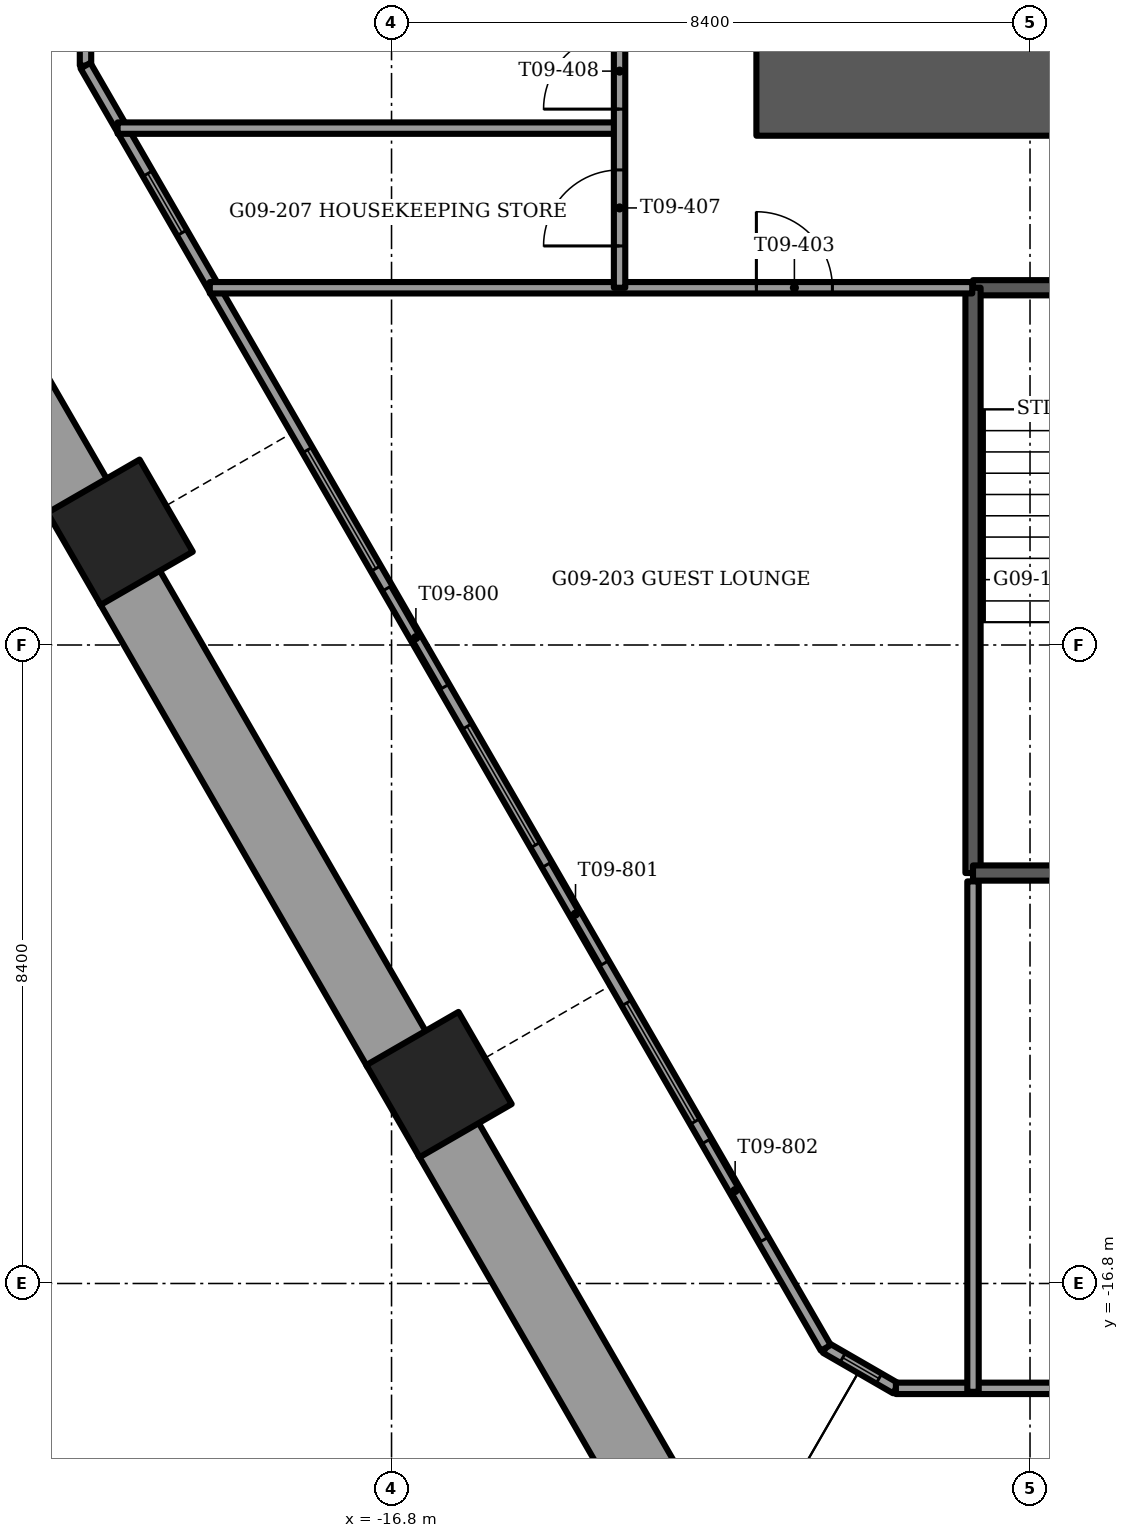
"""IFC4 building model, lengths in metres.
Left out: names, types, materials, properties, quantities, classifications, styles, units other than length and angle.
Written with IfcOpenShell. Run it as: python <this file> out.ifc"""

import sys

from ifc_helpers import new_model, si_unit, direction, frame, frame_2d, origin, origin_2d, place, context, subcontext, project, spatial, rectangle, extrude, element, fill, save


model = new_model("IFC4")
c1 = context("Model", 3, precision=1e-05, world=origin(), true_north=direction((0.0, 1.0)))
c2 = subcontext(c1, "Body", "Model", "MODEL_VIEW")
j1 = project(units=[si_unit("LENGTHUNIT", "METRE"), si_unit("PLANEANGLEUNIT", "RADIAN")], contexts=[c1])
p1 = place(None, origin())
s1 = spatial("IfcSite", under=j1, at=p1, CompositionType="ELEMENT")
p2 = place(p1, origin())
s2 = spatial("IfcBuilding", under=s1, at=p2, CompositionType="ELEMENT")
p3 = place(p2, frame((0.0, 0.0, 39.25)))
s3 = spatial("IfcBuildingStorey", under=s2, at=p3, CompositionType="ELEMENT", Elevation=39.25)
for number, where, z_axis, x_axis in (
    (1, (-20.371, -6.917, -1.2), (0.0, 0.0, 1.0), (-0.5, 0.866, 0.0)),
    (2, (-16.175, -14.183, -1.2), (0.0, 0.0, 1.0), (-0.5, 0.866, 0.0)),
):
    element("IfcColumn", number, at=place(p3, frame(where, z_axis=z_axis, x_axis=x_axis)), inside=s3, PredefinedType="COLUMN", context=c2, shape_type="SweptSolid", body=[
        extrude(rectangle(XDim=1.4, YDim=1.4, at=origin_2d()), origin(), (0.0, 0.0, 1.0), 3.75),
    ])
p4 = place(p3, frame((-12.0, -1.1, -0.3), z_axis=(0.0, 0.0, 1.0), x_axis=(1.0, 0.0, 0.0)))
e3 = element("IfcWall", 3, at=p4, inside=s3, PredefinedType="SHEAR", context=c2, shape_type="SweptSolid", body=[
    extrude(rectangle(XDim=24.0, YDim=1.2, at=frame_2d((12.0, 0.0))), origin(), (0.0, 0.0, 1.0), 3.75),
])
p5 = place(p4, frame((11.2, 0.0, 0.0)))
e4 = element("IfcOpeningElement", 4, at=p5, cuts=e3, PredefinedType="OPENING", context=c2, shape_type="SweptSolid", body=[
    extrude(rectangle(XDim=1.6, YDim=2.1, at=frame_2d((0.8, 1.05))), frame((0.0, 0.6, 0.0), z_axis=(0.0, -1.0, 0.0), x_axis=(1.0, 0.0, 0.0)), (0.0, 0.0, 1.0), 1.2),
])
p6 = place(p3, frame((-24.132, -0.901, 0.0), z_axis=(0.0, 0.0, 1.0), x_axis=(0.499983599745, -0.866034872269, 0.0)))
e5 = element("IfcWall", 5, at=p6, inside=s3, PredefinedType="PARAPET", context=c2, shape_type="SweptSolid", body=[
    extrude(rectangle(XDim=6.42, YDim=0.9, at=frame_2d((3.21, 0.0))), origin(), (0.0, 0.0, 1.0), 1.1),
])
p7 = place(p3, frame((-20.252, -7.622, 0.0), z_axis=(0.0, 0.0, 1.0), x_axis=(0.499997206141, -0.866027016814, 0.0)))
e6 = element("IfcWall", 6, at=p7, inside=s3, PredefinedType="PARAPET", context=c2, shape_type="SweptSolid", body=[
    extrude(rectangle(XDim=7.051, YDim=0.9, at=frame_2d((3.525, 0.0))), origin(), (0.0, 0.0, 1.0), 1.1),
])
p8 = place(p3, frame((-16.057, -14.889, 0.0), z_axis=(0.0, 0.0, 1.0), x_axis=(0.500000066162, -0.866025365586, 0.0)))
e7 = element("IfcWall", 7, at=p8, inside=s3, PredefinedType="PARAPET", context=c2, shape_type="SweptSolid", body=[
    extrude(rectangle(XDim=6.42, YDim=0.9, at=frame_2d((3.21, 0.0))), origin(), (0.0, 0.0, 1.0), 1.1),
])
p9 = place(p3, frame((-20.826, -0.778, 0.0), z_axis=(0.0, 0.0, 1.0), x_axis=(0.499999841607, -0.866025495233, 0.0)))
e8 = element("IfcWall", 8, at=p9, inside=s3, PredefinedType="SOLIDWALL", context=c2, shape_type="SweptSolid", body=[
    extrude(rectangle(XDim=19.479, YDim=0.15, at=frame_2d((9.739, 0.0))), origin(), (0.0, 0.0, 1.0), 3.45),
])
p10 = place(p9, frame((1.639, 0.0, 0.15)))
e9 = element("IfcOpeningElement", 9, at=p10, cuts=e8, PredefinedType="OPENING", context=c2, shape_type="SweptSolid", body=[
    extrude(rectangle(XDim=0.9, YDim=2.85, at=frame_2d((0.45, 1.425))), frame((0.0, 0.075, 0.0), z_axis=(0.0, -1.0, 0.0), x_axis=(1.0, 0.0, 0.0)), (0.0, 0.0, 1.0), 0.15),
])
p11 = place(p9, frame((5.839, 0.0, 0.15)))
e10 = element("IfcOpeningElement", 10, at=p11, cuts=e8, PredefinedType="OPENING", context=c2, shape_type="SweptSolid", body=[
    extrude(rectangle(XDim=1.8, YDim=2.85, at=frame_2d((0.9, 1.425))), frame((0.0, 0.075, 0.0), z_axis=(0.0, -1.0, 0.0), x_axis=(1.0, 0.0, 0.0)), (0.0, 0.0, 1.0), 0.15),
])
p12 = place(p9, frame((7.939, 0.0, 0.0)))
e11 = element("IfcOpeningElement", 11, at=p12, cuts=e8, PredefinedType="OPENING", context=c2, shape_type="SweptSolid", body=[
    extrude(rectangle(XDim=1.5, YDim=2.4, at=frame_2d((0.75, 1.2))), frame((0.0, 0.075, 0.0), z_axis=(0.0, -1.0, 0.0), x_axis=(1.0, 0.0, 0.0)), (0.0, 0.0, 1.0), 0.15),
])
p13 = place(p9, frame((10.039, 0.0, 0.15)))
e12 = element("IfcOpeningElement", 12, at=p13, cuts=e8, PredefinedType="OPENING", context=c2, shape_type="SweptSolid", body=[
    extrude(rectangle(XDim=1.8, YDim=2.85, at=frame_2d((0.9, 1.425))), frame((0.0, 0.075, 0.0), z_axis=(0.0, -1.0, 0.0), x_axis=(1.0, 0.0, 0.0)), (0.0, 0.0, 1.0), 0.15),
])
p14 = place(p9, frame((12.139, 0.0, 0.0)))
e13 = element("IfcOpeningElement", 13, at=p14, cuts=e8, PredefinedType="OPENING", context=c2, shape_type="SweptSolid", body=[
    extrude(rectangle(XDim=1.5, YDim=2.4, at=frame_2d((0.75, 1.2))), frame((0.0, 0.075, 0.0), z_axis=(0.0, -1.0, 0.0), x_axis=(1.0, 0.0, 0.0)), (0.0, 0.0, 1.0), 0.15),
])
p15 = place(p9, frame((14.239, 0.0, 0.15)))
e14 = element("IfcOpeningElement", 14, at=p15, cuts=e8, PredefinedType="OPENING", context=c2, shape_type="SweptSolid", body=[
    extrude(rectangle(XDim=1.8, YDim=2.85, at=frame_2d((0.9, 1.425))), frame((0.0, 0.075, 0.0), z_axis=(0.0, -1.0, 0.0), x_axis=(1.0, 0.0, 0.0)), (0.0, 0.0, 1.0), 0.15),
])
p16 = place(p9, frame((16.339, 0.0, 0.0)))
e15 = element("IfcOpeningElement", 15, at=p16, cuts=e8, PredefinedType="OPENING", context=c2, shape_type="SweptSolid", body=[
    extrude(rectangle(XDim=1.5, YDim=2.4, at=frame_2d((0.75, 1.2))), frame((0.0, 0.075, 0.0), z_axis=(0.0, -1.0, 0.0), x_axis=(1.0, 0.0, 0.0)), (0.0, 0.0, 1.0), 0.15),
])
p17 = place(p3, frame((-10.165, -18.179, 0.0), z_axis=(0.0, 0.0, 1.0), x_axis=(1.0, 0.0, 0.0)))
e16 = element("IfcWall", 16, at=p17, inside=s3, PredefinedType="SOLIDWALL", context=c2, shape_type="SweptSolid", body=[
    extrude(rectangle(XDim=20.329, YDim=0.15, at=frame_2d((10.165, 0.0))), origin(), (0.0, 0.0, 1.0), 3.45),
])
p18 = place(p17, frame((2.064, 0.0, 0.15)))
e17 = element("IfcOpeningElement", 17, at=p18, cuts=e16, PredefinedType="OPENING", context=c2, shape_type="SweptSolid", body=[
    extrude(rectangle(XDim=1.8, YDim=2.85, at=frame_2d((0.9, 1.425))), frame((0.0, 0.075, 0.0), z_axis=(0.0, -1.0, 0.0), x_axis=(1.0, 0.0, 0.0)), (0.0, 0.0, 1.0), 0.15),
])
p19 = place(p17, frame((6.314, 0.0, 0.15)))
e18 = element("IfcOpeningElement", 18, at=p19, cuts=e16, PredefinedType="OPENING", context=c2, shape_type="SweptSolid", body=[
    extrude(rectangle(XDim=0.9, YDim=2.85, at=frame_2d((0.45, 1.425))), frame((0.0, 0.075, 0.0), z_axis=(0.0, -1.0, 0.0), x_axis=(1.0, 0.0, 0.0)), (0.0, 0.0, 1.0), 0.15),
])
p20 = place(p17, frame((7.764, 0.0, 0.0)))
e19 = element("IfcOpeningElement", 19, at=p20, cuts=e16, PredefinedType="OPENING", context=c2, shape_type="SweptSolid", body=[
    extrude(rectangle(XDim=1.5, YDim=2.4, at=frame_2d((0.75, 1.2))), frame((0.0, 0.075, 0.0), z_axis=(0.0, -1.0, 0.0), x_axis=(1.0, 0.0, 0.0)), (0.0, 0.0, 1.0), 0.15),
])
p21 = place(p17, frame((10.514, 0.0, 0.15)))
e20 = element("IfcOpeningElement", 20, at=p21, cuts=e16, PredefinedType="OPENING", context=c2, shape_type="SweptSolid", body=[
    extrude(rectangle(XDim=1.8, YDim=2.85, at=frame_2d((0.9, 1.425))), frame((0.0, 0.075, 0.0), z_axis=(0.0, -1.0, 0.0), x_axis=(1.0, 0.0, 0.0)), (0.0, 0.0, 1.0), 0.15),
])
p22 = place(p17, frame((12.564, 0.0, 0.0)))
e21 = element("IfcOpeningElement", 21, at=p22, cuts=e16, PredefinedType="OPENING", context=c2, shape_type="SweptSolid", body=[
    extrude(rectangle(XDim=1.5, YDim=2.4, at=frame_2d((0.75, 1.2))), frame((0.0, 0.075, 0.0), z_axis=(0.0, -1.0, 0.0), x_axis=(1.0, 0.0, 0.0)), (0.0, 0.0, 1.0), 0.15),
])
p23 = place(p17, frame((16.314, 0.0, 0.15)))
e22 = element("IfcOpeningElement", 22, at=p23, cuts=e16, PredefinedType="OPENING", context=c2, shape_type="SweptSolid", body=[
    extrude(rectangle(XDim=1.8, YDim=2.85, at=frame_2d((0.9, 1.425))), frame((0.0, 0.075, 0.0), z_axis=(0.0, -1.0, 0.0), x_axis=(1.0, 0.0, 0.0)), (0.0, 0.0, 1.0), 0.15),
])
p24 = place(p3, frame((-20.826, 0.287, 0.0), z_axis=(0.0, 0.0, 1.0), x_axis=(0.0, -1.0, 0.0)))
e23 = element("IfcWall", 23, at=p24, inside=s3, PredefinedType="SOLIDWALL", context=c2, shape_type="SweptSolid", body=[
    extrude(rectangle(XDim=1.065, YDim=0.15, at=frame_2d((0.533, 0.0))), origin(), (0.0, 0.0, 1.0), 3.45),
])
p25 = place(p24, frame((0.258, 0.0, 0.15)))
e24 = element("IfcOpeningElement", 24, at=p25, cuts=e23, PredefinedType="OPENING", context=c2, shape_type="SweptSolid", body=[
    extrude(rectangle(XDim=0.55, YDim=2.85, at=frame_2d((0.275, 1.425))), frame((0.0, 0.075, 0.0), z_axis=(0.0, -1.0, 0.0), x_axis=(1.0, 0.0, 0.0)), (0.0, 0.0, 1.0), 0.15),
])
p26 = place(p3, frame((-11.087, -17.647, 0.0), z_axis=(0.0, 0.0, 1.0), x_axis=(0.866048165231, -0.499960573946, 0.0)))
e25 = element("IfcWall", 25, at=p26, inside=s3, PredefinedType="SOLIDWALL", context=c2, shape_type="SweptSolid", body=[
    extrude(rectangle(XDim=1.065, YDim=0.15, at=frame_2d((0.532, 0.0))), origin(), (0.0, 0.0, 1.0), 3.45),
])
p27 = place(p26, frame((0.258, 0.0, 0.15)))
e26 = element("IfcOpeningElement", 26, at=p27, cuts=e25, PredefinedType="OPENING", context=c2, shape_type="SweptSolid", body=[
    extrude(rectangle(XDim=0.55, YDim=2.85, at=frame_2d((0.275, 1.425))), frame((0.0, 0.075, 0.0), z_axis=(0.0, -1.0, 0.0), x_axis=(1.0, 0.0, 0.0)), (0.0, 0.0, 1.0), 0.15),
])
p28 = place(p3, frame((-9.15, -3.7, -0.3), z_axis=(0.0, 0.0, 1.0), x_axis=(1.0, 0.0, 0.0)))
e27 = element("IfcWall", 27, at=p28, inside=s3, PredefinedType="SOLIDWALL", context=c2, shape_type="SweptSolid", body=[
    extrude(rectangle(XDim=3.35, YDim=0.2, at=frame_2d((1.675, 0.0))), origin(), (0.0, 0.0, 1.0), 3.75),
])
p29 = place(p28, frame((1.125, 0.0, 0.0)))
e28 = element("IfcOpeningElement", 28, at=p29, cuts=e27, PredefinedType="OPENING", context=c2, shape_type="SweptSolid", body=[
    extrude(rectangle(XDim=1.1, YDim=2.1, at=frame_2d((0.55, 1.05))), frame((0.0, 0.1, 0.0), z_axis=(0.0, -1.0, 0.0), x_axis=(1.0, 0.0, 0.0)), (0.0, 0.0, 1.0), 0.2),
])
p30 = place(p3, frame((-9.15, -3.7, -0.3), z_axis=(0.0, 0.0, 1.0), x_axis=(0.0, -1.0, 0.0)))
e29 = element("IfcWall", 29, at=p30, inside=s3, PredefinedType="SOLIDWALL", context=c2, shape_type="SweptSolid", body=[
    extrude(rectangle(XDim=7.7, YDim=0.2, at=frame_2d((3.85, 0.0))), origin(), (0.0, 0.0, 1.0), 3.75),
])
p31 = place(p3, frame((-9.15, -11.4, -0.3), z_axis=(0.0, 0.0, 1.0), x_axis=(1.0, 0.0, 0.0)))
e30 = element("IfcWall", 30, at=p31, inside=s3, PredefinedType="SOLIDWALL", context=c2, shape_type="SweptSolid", body=[
    extrude(rectangle(XDim=3.35, YDim=0.2, at=frame_2d((1.675, 0.0))), origin(), (0.0, 0.0, 1.0), 3.75),
])
p32 = place(p3, frame((-19.191, -3.7, 0.0), z_axis=(0.0, 0.0, 1.0), x_axis=(1.0, 0.0, 0.0)))
e31 = element("IfcWall", 31, at=p32, inside=s3, PredefinedType="PARTITIONING", context=c2, shape_type="SweptSolid", body=[
    extrude(rectangle(XDim=10.031, YDim=0.15, at=frame_2d((5.016, 0.0))), origin(), (0.0, 0.0, 1.0), 3.45),
])
p33 = place(p32, frame((7.191, 0.0, 0.0)))
e32 = element("IfcOpeningElement", 32, at=p33, cuts=e31, PredefinedType="OPENING", context=c2, shape_type="SweptSolid", body=[
    extrude(rectangle(XDim=1.0, YDim=2.1, at=frame_2d((0.5, 1.05))), frame((0.0, 0.075, 0.0), z_axis=(0.0, -1.0, 0.0), x_axis=(1.0, 0.0, 0.0)), (0.0, 0.0, 1.0), 0.15),
])
p34 = place(p3, frame((-20.404, -1.6, 0.0), z_axis=(0.0, 0.0, 1.0), x_axis=(1.0, 0.0, 0.0)))
e33 = element("IfcWall", 33, at=p34, inside=s3, PredefinedType="PARTITIONING", context=c2, shape_type="SweptSolid", body=[
    extrude(rectangle(XDim=6.604, YDim=0.15, at=frame_2d((3.302, 0.0))), origin(), (0.0, 0.0, 1.0), 3.45),
])
p35 = place(p3, frame((-9.15, -18.225, 0.0), z_axis=(0.0, 0.0, 1.0), x_axis=(0.0, 1.0, 0.0)))
e34 = element("IfcWall", 34, at=p35, inside=s3, PredefinedType="PARTITIONING", context=c2, shape_type="SweptSolid", body=[
    extrude(rectangle(XDim=6.715, YDim=0.15, at=frame_2d((3.357, 0.0))), origin(), (0.0, 0.0, 1.0), 3.45),
])
p36 = place(p3, frame((-13.8, -3.7, 0.0), z_axis=(0.0, 0.0, 1.0), x_axis=(0.0, 1.0, 0.0)))
e35 = element("IfcWall", 35, at=p36, inside=s3, PredefinedType="PARTITIONING", context=c2, shape_type="SweptSolid", body=[
    extrude(rectangle(XDim=16.247, YDim=0.15, at=frame_2d((8.124, 0.0))), origin(), (0.0, 0.0, 1.0), 3.45),
])
p37 = place(p36, frame((0.55, 0.0, 0.0)))
e36 = element("IfcOpeningElement", 36, at=p37, cuts=e35, PredefinedType="OPENING", context=c2, shape_type="SweptSolid", body=[
    extrude(rectangle(XDim=1.0, YDim=2.1, at=frame_2d((0.5, 1.05))), frame((0.0, 0.075, 0.0), z_axis=(0.0, -1.0, 0.0), x_axis=(1.0, 0.0, 0.0)), (0.0, 0.0, 1.0), 0.15),
])
p38 = place(p36, frame((2.35, 0.0, 0.0)))
e37 = element("IfcOpeningElement", 37, at=p38, cuts=e35, PredefinedType="OPENING", context=c2, shape_type="SweptSolid", body=[
    extrude(rectangle(XDim=1.0, YDim=2.1, at=frame_2d((0.5, 1.05))), frame((0.0, 0.075, 0.0), z_axis=(0.0, -1.0, 0.0), x_axis=(1.0, 0.0, 0.0)), (0.0, 0.0, 1.0), 0.15),
])
p39 = place(p36, frame((6.85, 0.0, 0.0)))
e38 = element("IfcOpeningElement", 38, at=p39, cuts=e35, PredefinedType="OPENING", context=c2, shape_type="SweptSolid", body=[
    extrude(rectangle(XDim=1.0, YDim=2.1, at=frame_2d((0.5, 1.05))), frame((0.0, 0.075, 0.0), z_axis=(0.0, -1.0, 0.0), x_axis=(1.0, 0.0, 0.0)), (0.0, 0.0, 1.0), 0.15),
])
p40 = place(p36, frame((11.703, 0.0, 0.0)))
e39 = element("IfcOpeningElement", 39, at=p40, cuts=e35, PredefinedType="OPENING", context=c2, shape_type="SweptSolid", body=[
    extrude(rectangle(XDim=1.0, YDim=2.1, at=frame_2d((0.5, 1.05))), frame((0.0, 0.075, 0.0), z_axis=(0.0, -1.0, 0.0), x_axis=(1.0, 0.0, 0.0)), (0.0, 0.0, 1.0), 0.15),
])
p41 = place(p10, origin())
e40 = element("IfcWindow", 40, at=p41, inside=s3, PartitioningType="SINGLE_PANEL", PredefinedType="WINDOW", context=c2, shape_type="SweptSolid", body=[
    extrude(rectangle(XDim=0.9, YDim=2.85, at=frame_2d((0.45, 1.425))), frame((0.0, 0.03, 0.0), z_axis=(0.0, -1.0, 0.0), x_axis=(1.0, 0.0, 0.0)), (0.0, 0.0, 1.0), 0.06),
])
fill(e9, e40)
p42 = place(p11, origin())
e41 = element("IfcWindow", 41, at=p42, inside=s3, PartitioningType="SINGLE_PANEL", PredefinedType="WINDOW", context=c2, shape_type="SweptSolid", body=[
    extrude(rectangle(XDim=1.8, YDim=2.85, at=frame_2d((0.9, 1.425))), frame((0.0, 0.03, 0.0), z_axis=(0.0, -1.0, 0.0), x_axis=(1.0, 0.0, 0.0)), (0.0, 0.0, 1.0), 0.06),
])
fill(e10, e41)
p43 = place(p12, origin())
e42 = element("IfcDoor", 42, at=p43, inside=s3, OperationType="SLIDING_TO_RIGHT", PredefinedType="DOOR", context=c2, shape_type="SweptSolid", body=[
    extrude(rectangle(XDim=1.5, YDim=2.4, at=frame_2d((0.75, 1.2))), frame((0.0, 0.025, 0.0), z_axis=(0.0, -1.0, 0.0), x_axis=(1.0, 0.0, 0.0)), (0.0, 0.0, 1.0), 0.05),
])
fill(e11, e42)
p44 = place(p13, origin())
e43 = element("IfcWindow", 43, at=p44, inside=s3, PartitioningType="SINGLE_PANEL", PredefinedType="WINDOW", context=c2, shape_type="SweptSolid", body=[
    extrude(rectangle(XDim=1.8, YDim=2.85, at=frame_2d((0.9, 1.425))), frame((0.0, 0.03, 0.0), z_axis=(0.0, -1.0, 0.0), x_axis=(1.0, 0.0, 0.0)), (0.0, 0.0, 1.0), 0.06),
])
fill(e12, e43)
p45 = place(p14, origin())
e44 = element("IfcDoor", 44, at=p45, inside=s3, OperationType="SLIDING_TO_LEFT", PredefinedType="DOOR", context=c2, shape_type="SweptSolid", body=[
    extrude(rectangle(XDim=1.5, YDim=2.4, at=frame_2d((0.75, 1.2))), frame((0.0, 0.025, 0.0), z_axis=(0.0, -1.0, 0.0), x_axis=(1.0, 0.0, 0.0)), (0.0, 0.0, 1.0), 0.05),
])
fill(e13, e44)
p46 = place(p15, origin())
e45 = element("IfcWindow", 45, at=p46, inside=s3, PartitioningType="SINGLE_PANEL", PredefinedType="WINDOW", context=c2, shape_type="SweptSolid", body=[
    extrude(rectangle(XDim=1.8, YDim=2.85, at=frame_2d((0.9, 1.425))), frame((0.0, 0.03, 0.0), z_axis=(0.0, -1.0, 0.0), x_axis=(1.0, 0.0, 0.0)), (0.0, 0.0, 1.0), 0.06),
])
fill(e14, e45)
p47 = place(p16, origin())
e46 = element("IfcDoor", 46, at=p47, inside=s3, OperationType="SLIDING_TO_RIGHT", PredefinedType="DOOR", context=c2, shape_type="SweptSolid", body=[
    extrude(rectangle(XDim=1.5, YDim=2.4, at=frame_2d((0.75, 1.2))), frame((0.0, 0.025, 0.0), z_axis=(0.0, -1.0, 0.0), x_axis=(1.0, 0.0, 0.0)), (0.0, 0.0, 1.0), 0.05),
])
fill(e15, e46)
p48 = place(p27, origin())
e47 = element("IfcWindow", 47, at=p48, inside=s3, PartitioningType="SINGLE_PANEL", PredefinedType="WINDOW", context=c2, shape_type="SweptSolid", body=[
    extrude(rectangle(XDim=0.55, YDim=2.85, at=frame_2d((0.275, 1.425))), frame((0.0, 0.03, 0.0), z_axis=(0.0, -1.0, 0.0), x_axis=(1.0, 0.0, 0.0)), (0.0, 0.0, 1.0), 0.06),
])
fill(e26, e47)
p49 = place(p33, origin())
e48 = element("IfcDoor", 48, at=p49, inside=s3, OperationType="SINGLE_SWING_RIGHT", PredefinedType="DOOR", context=c2, shape_type="SweptSolid", body=[
    extrude(rectangle(XDim=1.0, YDim=2.1, at=frame_2d((0.5, 1.05))), frame((0.0, 0.025, 0.0), z_axis=(0.0, -1.0, 0.0), x_axis=(1.0, 0.0, 0.0)), (0.0, 0.0, 1.0), 0.05),
])
fill(e32, e48)
p50 = place(p37, origin())
e49 = element("IfcDoor", 49, at=p50, inside=s3, OperationType="SINGLE_SWING_LEFT", PredefinedType="DOOR", context=c2, shape_type="SweptSolid", body=[
    extrude(rectangle(XDim=1.0, YDim=2.1, at=frame_2d((0.5, 1.05))), frame((0.0, 0.025, 0.0), z_axis=(0.0, -1.0, 0.0), x_axis=(1.0, 0.0, 0.0)), (0.0, 0.0, 1.0), 0.05),
])
fill(e36, e49)
p51 = place(p38, origin())
e50 = element("IfcDoor", 50, at=p51, inside=s3, OperationType="SINGLE_SWING_LEFT", PredefinedType="DOOR", context=c2, shape_type="SweptSolid", body=[
    extrude(rectangle(XDim=1.0, YDim=2.1, at=frame_2d((0.5, 1.05))), frame((0.0, 0.025, 0.0), z_axis=(0.0, -1.0, 0.0), x_axis=(1.0, 0.0, 0.0)), (0.0, 0.0, 1.0), 0.05),
])
fill(e37, e50)
save(model, sys.argv[1])
